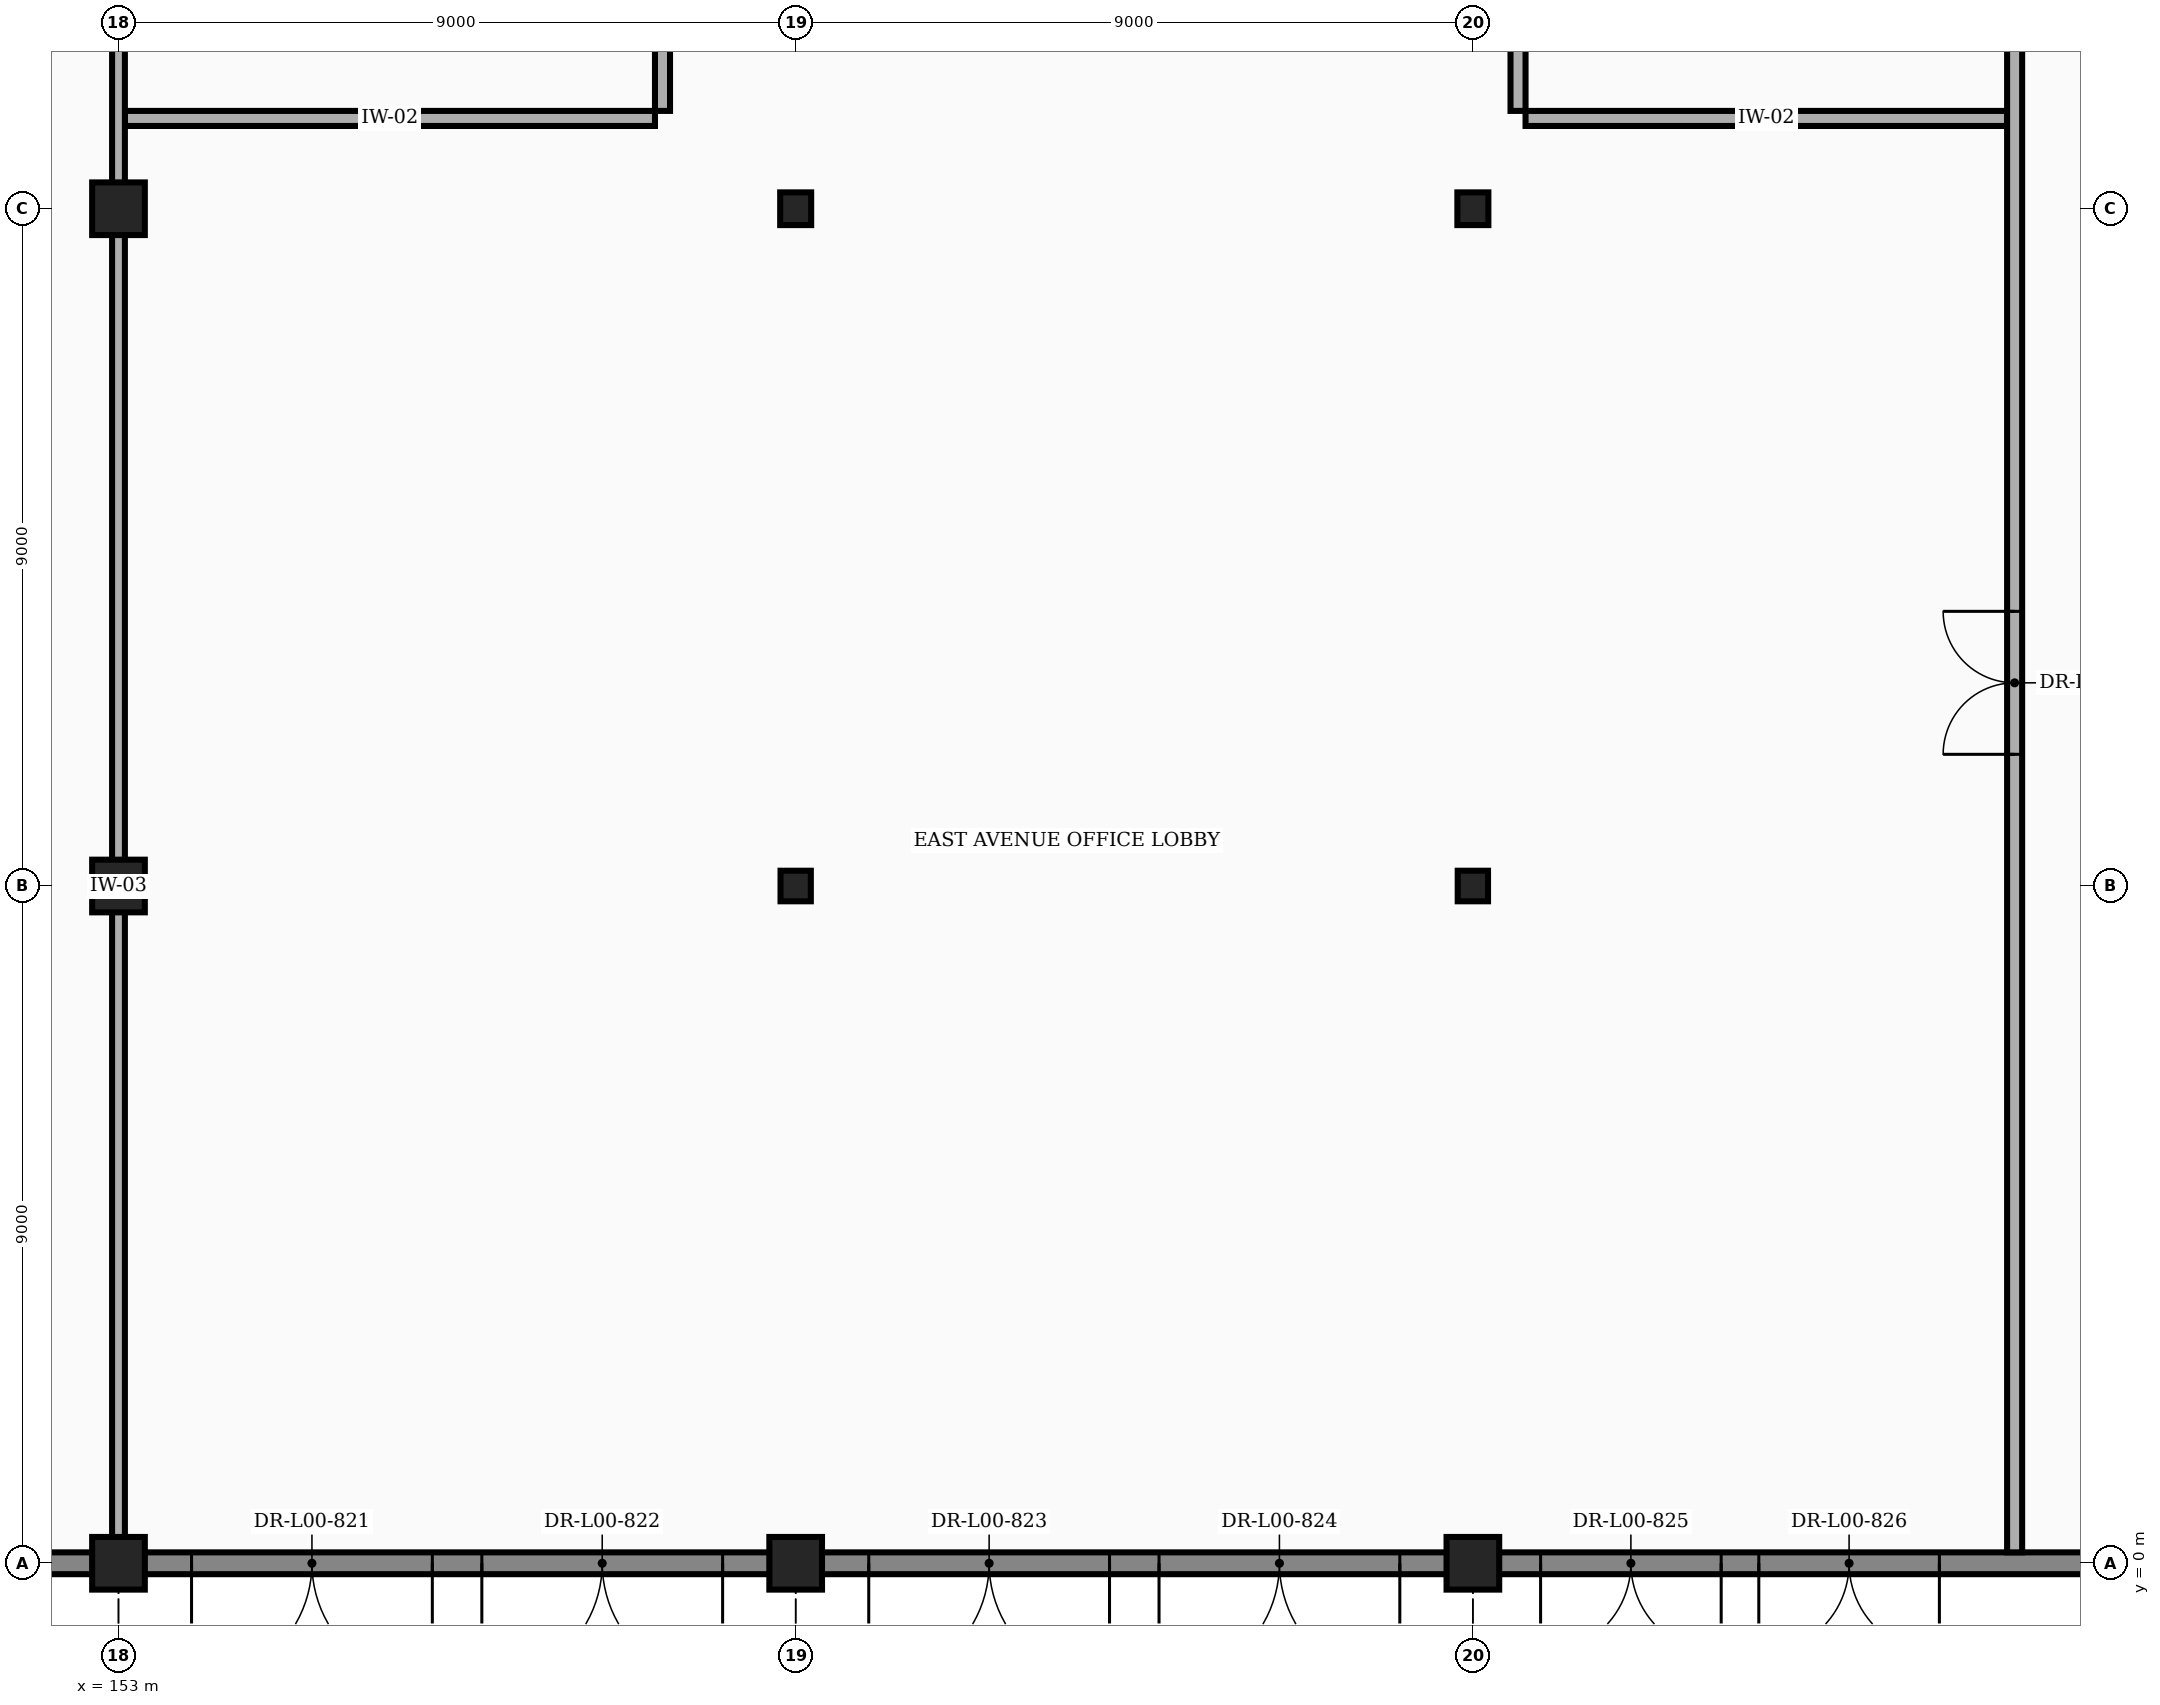
"""IFC4 building model, lengths in metres.
Left out: names, types, materials, properties, quantities, classifications, styles, units other than length and angle.
Written with IfcOpenShell. Run it as: python <this file> out.ifc"""

import sys

from ifc_helpers import new_model, si_unit, direction, frame, frame_2d, origin, origin_2d, place, context, subcontext, project, spatial, rectangle, i_section, extrude, element, fill, save


model = new_model("IFC4")
c1 = context("Model", 3, precision=1e-05, world=origin(), true_north=direction((0.0, 1.0)))
c2 = subcontext(c1, "Body", "Model", "MODEL_VIEW")
j1 = project(units=[si_unit("LENGTHUNIT", "METRE"), si_unit("PLANEANGLEUNIT", "RADIAN")], contexts=[c1])
p1 = place(None, origin())
s1 = spatial("IfcSite", under=j1, at=p1, CompositionType="ELEMENT")
p2 = place(p1, origin())
s2 = spatial("IfcBuilding", under=s1, at=p2, CompositionType="ELEMENT")
p3 = place(p2, origin())
s3 = spatial("IfcBuildingStorey", under=s2, at=p3, CompositionType="ELEMENT", Elevation=0.0)
for number, where, z_axis, x_axis in (
    (1, (153.0, 0.0, 0.0), (0.0, 0.0, 1.0), (1.0, 0.0, 0.0)),
    (2, (153.0, 9.0, 0.0), (0.0, 0.0, 1.0), (1.0, 0.0, 0.0)),
    (3, (153.0, 18.0, 0.0), (0.0, 0.0, 1.0), (1.0, 0.0, 0.0)),
    (4, (162.0, 0.0, 0.0), (0.0, 0.0, 1.0), (1.0, 0.0, 0.0)),
):
    element("IfcColumn", number, at=place(p3, frame(where, z_axis=z_axis, x_axis=x_axis)), inside=s3, PredefinedType="COLUMN", context=c2, shape_type="SweptSolid", body=[
        extrude(rectangle(XDim=0.7, YDim=0.7, at=origin_2d()), origin(), (0.0, 0.0, 1.0), 6.0),
    ])
p4 = place(p3, frame((162.0, 9.0, 0.0), z_axis=(0.0, 0.0, 1.0), x_axis=(1.0, 0.0, 0.0)))
e5 = element("IfcColumn", 5, at=p4, inside=s3, PredefinedType="COLUMN", context=c2, shape_type="SweptSolid", body=[
    extrude(i_section(OverallWidth=0.403, OverallDepth=0.406, WebThickness=0.027, FlangeThickness=0.043, at=origin_2d()), origin(), (0.0, 0.0, 1.0), 6.0),
])
p5 = place(p3, frame((162.0, 18.0, 0.0), z_axis=(0.0, 0.0, 1.0), x_axis=(1.0, 0.0, 0.0)))
e6 = element("IfcColumn", 6, at=p5, inside=s3, PredefinedType="COLUMN", context=c2, shape_type="SweptSolid", body=[
    extrude(i_section(OverallWidth=0.412, OverallDepth=0.435, WebThickness=0.036, FlangeThickness=0.058, at=origin_2d()), origin(), (0.0, 0.0, 1.0), 6.0),
])
p6 = place(p3, frame((171.0, 0.0, 0.0), z_axis=(0.0, 0.0, 1.0), x_axis=(1.0, 0.0, 0.0)))
e7 = element("IfcColumn", 7, at=p6, inside=s3, PredefinedType="COLUMN", context=c2, shape_type="SweptSolid", body=[
    extrude(rectangle(XDim=0.7, YDim=0.7, at=origin_2d()), origin(), (0.0, 0.0, 1.0), 6.0),
])
p7 = place(p3, frame((171.0, 9.0, 0.0), z_axis=(0.0, 0.0, 1.0), x_axis=(1.0, 0.0, 0.0)))
e8 = element("IfcColumn", 8, at=p7, inside=s3, PredefinedType="COLUMN", context=c2, shape_type="SweptSolid", body=[
    extrude(i_section(OverallWidth=0.403, OverallDepth=0.406, WebThickness=0.027, FlangeThickness=0.043, at=origin_2d()), origin(), (0.0, 0.0, 1.0), 6.0),
])
p8 = place(p3, frame((171.0, 18.0, 0.0), z_axis=(0.0, 0.0, 1.0), x_axis=(1.0, 0.0, 0.0)))
e9 = element("IfcColumn", 9, at=p8, inside=s3, PredefinedType="COLUMN", context=c2, shape_type="SweptSolid", body=[
    extrude(i_section(OverallWidth=0.412, OverallDepth=0.435, WebThickness=0.036, FlangeThickness=0.058, at=origin_2d()), origin(), (0.0, 0.0, 1.0), 6.0),
])
p9 = place(p3, frame((135.342, 0.0, 0.0), z_axis=(0.0, 0.0, 1.0), x_axis=(1.0, 0.0, 0.0)))
e10 = element("IfcWall", 10, at=p9, inside=s3, PredefinedType="STANDARD", context=c2, shape_type="SweptSolid", body=[
    extrude(rectangle(XDim=17.316, YDim=0.29, at=frame_2d((8.658, 0.0))), origin(), (0.0, 0.0, 1.0), 4.988),
])
p10 = place(p9, frame((1.386, 0.0, 0.0)))
e11 = element("IfcOpeningElement", 11, at=p10, cuts=e10, PredefinedType="OPENING", context=c2, shape_type="SweptSolid", body=[
    extrude(rectangle(XDim=3.0, YDim=2.4, at=frame_2d((1.5, 1.2))), frame((0.0, 0.157, 0.0), z_axis=(0.0, -1.0, 0.0), x_axis=(1.0, 0.0, 0.0)), (0.0, 0.0, 1.0), 0.314),
])
p11 = place(p9, frame((7.158, 0.0, 0.0)))
e12 = element("IfcOpeningElement", 12, at=p11, cuts=e10, PredefinedType="OPENING", context=c2, shape_type="SweptSolid", body=[
    extrude(rectangle(XDim=3.0, YDim=2.4, at=frame_2d((1.5, 1.2))), frame((0.0, 0.157, 0.0), z_axis=(0.0, -1.0, 0.0), x_axis=(1.0, 0.0, 0.0)), (0.0, 0.0, 1.0), 0.314),
])
p12 = place(p3, frame((153.342, 0.0, 0.0), z_axis=(0.0, 0.0, 1.0), x_axis=(1.0, 0.0, 0.0)))
e13 = element("IfcWall", 13, at=p12, inside=s3, PredefinedType="STANDARD", context=c2, shape_type="SweptSolid", body=[
    extrude(rectangle(XDim=8.316, YDim=0.29, at=frame_2d((4.158, 0.0))), origin(), (0.0, 0.0, 1.0), 5.138),
])
p13 = place(p12, frame((0.629, 0.0, 0.0)))
e14 = element("IfcOpeningElement", 14, at=p13, cuts=e13, PredefinedType="OPENING", context=c2, shape_type="SweptSolid", body=[
    extrude(rectangle(XDim=3.2, YDim=2.4, at=frame_2d((1.6, 1.2))), frame((0.0, 0.157, 0.0), z_axis=(0.0, -1.0, 0.0), x_axis=(1.0, 0.0, 0.0)), (0.0, 0.0, 1.0), 0.314),
])
p14 = place(p12, frame((4.487, 0.0, 0.0)))
e15 = element("IfcOpeningElement", 15, at=p14, cuts=e13, PredefinedType="OPENING", context=c2, shape_type="SweptSolid", body=[
    extrude(rectangle(XDim=3.2, YDim=2.4, at=frame_2d((1.6, 1.2))), frame((0.0, 0.157, 0.0), z_axis=(0.0, -1.0, 0.0), x_axis=(1.0, 0.0, 0.0)), (0.0, 0.0, 1.0), 0.314),
])
p15 = place(p3, frame((162.342, 0.0, 0.0), z_axis=(0.0, 0.0, 1.0), x_axis=(1.0, 0.0, 0.0)))
e16 = element("IfcWall", 16, at=p15, inside=s3, PredefinedType="STANDARD", context=c2, shape_type="SweptSolid", body=[
    extrude(rectangle(XDim=8.316, YDim=0.29, at=frame_2d((4.158, 0.0))), origin(), (0.0, 0.0, 1.0), 5.138),
])
p16 = place(p15, frame((0.629, 0.0, 0.0)))
e17 = element("IfcOpeningElement", 17, at=p16, cuts=e16, PredefinedType="OPENING", context=c2, shape_type="SweptSolid", body=[
    extrude(rectangle(XDim=3.2, YDim=2.4, at=frame_2d((1.6, 1.2))), frame((0.0, 0.157, 0.0), z_axis=(0.0, -1.0, 0.0), x_axis=(1.0, 0.0, 0.0)), (0.0, 0.0, 1.0), 0.314),
])
p17 = place(p15, frame((4.487, 0.0, 0.0)))
e18 = element("IfcOpeningElement", 18, at=p17, cuts=e16, PredefinedType="OPENING", context=c2, shape_type="SweptSolid", body=[
    extrude(rectangle(XDim=3.2, YDim=2.4, at=frame_2d((1.6, 1.2))), frame((0.0, 0.157, 0.0), z_axis=(0.0, -1.0, 0.0), x_axis=(1.0, 0.0, 0.0)), (0.0, 0.0, 1.0), 0.314),
])
p18 = place(p3, frame((171.342, 0.0, 0.0), z_axis=(0.0, 0.0, 1.0), x_axis=(1.0, 0.0, 0.0)))
e19 = element("IfcWall", 19, at=p18, inside=s3, PredefinedType="STANDARD", context=c2, shape_type="SweptSolid", body=[
    extrude(rectangle(XDim=17.316, YDim=0.29, at=frame_2d((8.658, 0.0))), origin(), (0.0, 0.0, 1.0), 4.988),
])
p19 = place(p18, frame((0.558, 0.0, 0.0)))
e20 = element("IfcOpeningElement", 20, at=p19, cuts=e19, PredefinedType="OPENING", context=c2, shape_type="SweptSolid", body=[
    extrude(rectangle(XDim=2.4, YDim=2.4, at=frame_2d((1.2, 1.2))), frame((0.0, 0.157, 0.0), z_axis=(0.0, -1.0, 0.0), x_axis=(1.0, 0.0, 0.0)), (0.0, 0.0, 1.0), 0.314),
])
p20 = place(p18, frame((3.458, 0.0, 0.0)))
e21 = element("IfcOpeningElement", 21, at=p20, cuts=e19, PredefinedType="OPENING", context=c2, shape_type="SweptSolid", body=[
    extrude(rectangle(XDim=2.4, YDim=2.4, at=frame_2d((1.2, 1.2))), frame((0.0, 0.157, 0.0), z_axis=(0.0, -1.0, 0.0), x_axis=(1.0, 0.0, 0.0)), (0.0, 0.0, 1.0), 0.314),
])
p21 = place(p18, frame((13.666, 0.0, 0.85)))
e22 = element("IfcOpeningElement", 22, at=p21, cuts=e19, PredefinedType="OPENING", context=c2, shape_type="SweptSolid", body=[
    extrude(rectangle(XDim=3.0, YDim=2.6, at=frame_2d((1.5, 1.3))), frame((0.0, 0.157, 0.0), z_axis=(0.0, -1.0, 0.0), x_axis=(1.0, 0.0, 0.0)), (0.0, 0.0, 1.0), 0.314),
])
p22 = place(p3, frame((153.085, 19.2, 0.0), z_axis=(0.0, 0.0, 1.0), x_axis=(1.0, 0.0, 0.0)))
e23 = element("IfcWall", 23, at=p22, inside=s3, PredefinedType="PARTITIONING", context=c2, shape_type="SweptSolid", body=[
    extrude(rectangle(XDim=7.045, YDim=0.2, at=frame_2d((3.522, 0.0))), origin(), (0.0, 0.0, 1.0), 5.75),
])
p23 = place(p3, frame((171.7, 19.2, 0.0), z_axis=(0.0, 0.0, 1.0), x_axis=(1.0, 0.0, 0.0)))
e24 = element("IfcWall", 24, at=p23, inside=s3, PredefinedType="PARTITIONING", context=c2, shape_type="SweptSolid", body=[
    extrude(rectangle(XDim=6.4, YDim=0.2, at=frame_2d((3.2, 0.0))), origin(), (0.0, 0.0, 1.0), 5.75),
])
p24 = place(p3, frame((178.2, 0.145, 0.0), z_axis=(0.0, 0.0, 1.0), x_axis=(0.0, 1.0, 0.0)))
e25 = element("IfcWall", 25, at=p24, inside=s3, PredefinedType="PARTITIONING", context=c2, shape_type="SweptSolid", body=[
    extrude(rectangle(XDim=39.095, YDim=0.2, at=frame_2d((19.547, 0.0))), origin(), (0.0, 0.0, 1.0), 5.75),
])
p25 = place(p24, frame((10.605, 0.0, 0.0)))
e26 = element("IfcOpeningElement", 26, at=p25, cuts=e25, PredefinedType="OPENING", context=c2, shape_type="SweptSolid", body=[
    extrude(rectangle(XDim=1.9, YDim=2.35, at=frame_2d((0.95, 1.175))), frame((0.0, 0.112, 0.0), z_axis=(0.0, -1.0, 0.0), x_axis=(1.0, 0.0, 0.0)), (0.0, 0.0, 1.0), 0.224),
])
p26 = place(p24, frame((23.705, 0.0, 0.0)))
e27 = element("IfcOpeningElement", 27, at=p26, cuts=e25, PredefinedType="OPENING", context=c2, shape_type="SweptSolid", body=[
    extrude(rectangle(XDim=1.7, YDim=2.3, at=frame_2d((0.85, 1.15))), frame((0.0, 0.112, 0.0), z_axis=(0.0, -1.0, 0.0), x_axis=(1.0, 0.0, 0.0)), (0.0, 0.0, 1.0), 0.224),
])
p27 = place(p24, frame((30.705, 0.0, 0.0)))
e28 = element("IfcOpeningElement", 28, at=p27, cuts=e25, PredefinedType="OPENING", context=c2, shape_type="SweptSolid", body=[
    extrude(rectangle(XDim=1.5, YDim=2.2, at=frame_2d((0.75, 1.1))), frame((0.0, 0.112, 0.0), z_axis=(0.0, -1.0, 0.0), x_axis=(1.0, 0.0, 0.0)), (0.0, 0.0, 1.0), 0.224),
])
p28 = place(p24, frame((35.405, 0.0, 0.0)))
e29 = element("IfcOpeningElement", 29, at=p28, cuts=e25, PredefinedType="OPENING", context=c2, shape_type="SweptSolid", body=[
    extrude(rectangle(XDim=1.15, YDim=2.15, at=frame_2d((0.575, 1.075))), frame((0.0, 0.112, 0.0), z_axis=(0.0, -1.0, 0.0), x_axis=(1.0, 0.0, 0.0)), (0.0, 0.0, 1.0), 0.224),
])
p29 = place(p3, frame((153.0, 0.22, 0.0), z_axis=(0.0, 0.0, 1.0), x_axis=(0.0, 1.0, 0.0)))
e30 = element("IfcWall", 30, at=p29, inside=s3, PredefinedType="PARTITIONING", context=c2, shape_type="SweptSolid", body=[
    extrude(rectangle(XDim=17.56, YDim=0.17, at=frame_2d((8.78, 0.0))), origin(), (0.0, 0.0, 1.0), 5.217),
])
p30 = place(p3, frame((153.0, 18.22, 0.0), z_axis=(0.0, 0.0, 1.0), x_axis=(0.0, 1.0, 0.0)))
e31 = element("IfcWall", 31, at=p30, inside=s3, PredefinedType="PARTITIONING", context=c2, shape_type="SweptSolid", body=[
    extrude(rectangle(XDim=8.56, YDim=0.17, at=frame_2d((4.28, 0.0))), origin(), (0.0, 0.0, 1.0), 5.217),
])
p31 = place(p3, frame((160.23, 19.3, 0.0), z_axis=(0.0, 0.0, 1.0), x_axis=(0.0, 1.0, 0.0)))
e32 = element("IfcWall", 32, at=p31, inside=s3, PredefinedType="PARTITIONING", context=c2, shape_type="SweptSolid", body=[
    extrude(rectangle(XDim=10.8, YDim=0.2, at=frame_2d((5.4, 0.0))), origin(), (0.0, 0.0, 1.0), 5.75),
])
p32 = place(p31, frame((4.55, 0.0, 0.0)))
e33 = element("IfcOpeningElement", 33, at=p32, cuts=e32, PredefinedType="OPENING", context=c2, shape_type="SweptSolid", body=[
    extrude(rectangle(XDim=1.7, YDim=2.3, at=frame_2d((0.85, 1.15))), frame((0.0, 0.112, 0.0), z_axis=(0.0, -1.0, 0.0), x_axis=(1.0, 0.0, 0.0)), (0.0, 0.0, 1.0), 0.224),
])
p33 = place(p3, frame((171.6, 19.3, 0.0), z_axis=(0.0, 0.0, 1.0), x_axis=(0.0, 1.0, 0.0)))
e34 = element("IfcWall", 34, at=p33, inside=s3, PredefinedType="PARTITIONING", context=c2, shape_type="SweptSolid", body=[
    extrude(rectangle(XDim=10.8, YDim=0.2, at=frame_2d((5.4, 0.0))), origin(), (0.0, 0.0, 1.0), 5.75),
])
p34 = place(p13, frame((3.2, 0.0, 0.0), z_axis=(0.0, 0.0, 1.0), x_axis=(-1.0, 0.0, 0.0)))
e35 = element("IfcDoor", 35, at=p34, inside=s3, OperationType="DOUBLE_DOOR_SINGLE_SWING", PredefinedType="DOOR", context=c2, shape_type="SweptSolid", body=[
    extrude(rectangle(XDim=3.2, YDim=2.4, at=frame_2d((1.6, 1.2))), frame((0.0, 0.025, 0.0), z_axis=(0.0, -1.0, 0.0), x_axis=(1.0, 0.0, 0.0)), (0.0, 0.0, 1.0), 0.05),
])
fill(e14, e35)
p35 = place(p14, frame((3.2, 0.0, 0.0), z_axis=(0.0, 0.0, 1.0), x_axis=(-1.0, 0.0, 0.0)))
e36 = element("IfcDoor", 36, at=p35, inside=s3, OperationType="DOUBLE_DOOR_SINGLE_SWING", PredefinedType="DOOR", context=c2, shape_type="SweptSolid", body=[
    extrude(rectangle(XDim=3.2, YDim=2.4, at=frame_2d((1.6, 1.2))), frame((0.0, 0.025, 0.0), z_axis=(0.0, -1.0, 0.0), x_axis=(1.0, 0.0, 0.0)), (0.0, 0.0, 1.0), 0.05),
])
fill(e15, e36)
p36 = place(p16, frame((3.2, 0.0, 0.0), z_axis=(0.0, 0.0, 1.0), x_axis=(-1.0, 0.0, 0.0)))
e37 = element("IfcDoor", 37, at=p36, inside=s3, OperationType="DOUBLE_DOOR_SINGLE_SWING", PredefinedType="DOOR", context=c2, shape_type="SweptSolid", body=[
    extrude(rectangle(XDim=3.2, YDim=2.4, at=frame_2d((1.6, 1.2))), frame((0.0, 0.025, 0.0), z_axis=(0.0, -1.0, 0.0), x_axis=(1.0, 0.0, 0.0)), (0.0, 0.0, 1.0), 0.05),
])
fill(e17, e37)
p37 = place(p17, frame((3.2, 0.0, 0.0), z_axis=(0.0, 0.0, 1.0), x_axis=(-1.0, 0.0, 0.0)))
e38 = element("IfcDoor", 38, at=p37, inside=s3, OperationType="DOUBLE_DOOR_SINGLE_SWING", PredefinedType="DOOR", context=c2, shape_type="SweptSolid", body=[
    extrude(rectangle(XDim=3.2, YDim=2.4, at=frame_2d((1.6, 1.2))), frame((0.0, 0.025, 0.0), z_axis=(0.0, -1.0, 0.0), x_axis=(1.0, 0.0, 0.0)), (0.0, 0.0, 1.0), 0.05),
])
fill(e18, e38)
p38 = place(p19, frame((2.4, 0.0, 0.0), z_axis=(0.0, 0.0, 1.0), x_axis=(-1.0, 0.0, 0.0)))
e39 = element("IfcDoor", 39, at=p38, inside=s3, OperationType="DOUBLE_DOOR_SINGLE_SWING", PredefinedType="DOOR", context=c2, shape_type="SweptSolid", body=[
    extrude(rectangle(XDim=2.4, YDim=2.4, at=frame_2d((1.2, 1.2))), frame((0.0, 0.025, 0.0), z_axis=(0.0, -1.0, 0.0), x_axis=(1.0, 0.0, 0.0)), (0.0, 0.0, 1.0), 0.05),
])
fill(e20, e39)
p39 = place(p20, frame((2.4, 0.0, 0.0), z_axis=(0.0, 0.0, 1.0), x_axis=(-1.0, 0.0, 0.0)))
e40 = element("IfcDoor", 40, at=p39, inside=s3, OperationType="DOUBLE_DOOR_SINGLE_SWING", PredefinedType="DOOR", context=c2, shape_type="SweptSolid", body=[
    extrude(rectangle(XDim=2.4, YDim=2.4, at=frame_2d((1.2, 1.2))), frame((0.0, 0.025, 0.0), z_axis=(0.0, -1.0, 0.0), x_axis=(1.0, 0.0, 0.0)), (0.0, 0.0, 1.0), 0.05),
])
fill(e21, e40)
p40 = place(p25, origin())
e41 = element("IfcDoor", 41, at=p40, inside=s3, OperationType="DOUBLE_DOOR_SINGLE_SWING", PredefinedType="DOOR", context=c2, shape_type="SweptSolid", body=[
    extrude(rectangle(XDim=1.9, YDim=2.35, at=frame_2d((0.95, 1.175))), frame((0.0, 0.025, 0.0), z_axis=(0.0, -1.0, 0.0), x_axis=(1.0, 0.0, 0.0)), (0.0, 0.0, 1.0), 0.05),
])
fill(e26, e41)
save(model, sys.argv[1])
